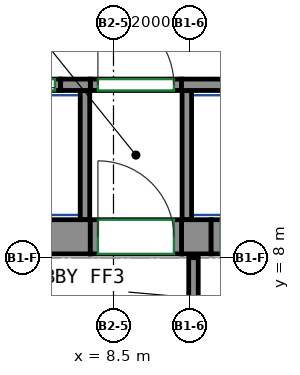
"""IFC4 building model, lengths in metres.
Left out: names, types, materials, properties, quantities, classifications, styles, units other than length and angle.
Written with IfcOpenShell. Run it as: python <this file> out.ifc"""

import sys

from ifc_helpers import new_model, si_unit, direction, frame, frame_2d, origin, place, context, subcontext, project, spatial, rectangle, extrude, source, transform, mapped, element, fill, save


model = new_model("IFC4")
c1 = context("Model", 3, precision=1e-05, world=origin(), true_north=direction((0.0, 1.0)))
c2 = subcontext(c1, "Body", "Model", "MODEL_VIEW")
j1 = project(units=[si_unit("LENGTHUNIT", "METRE"), si_unit("PLANEANGLEUNIT", "RADIAN")], contexts=[c1])
p1 = place(None, origin())
s1 = spatial("IfcSite", under=j1, at=p1, CompositionType="ELEMENT")
p2 = place(p1, origin())
s2 = spatial("IfcBuilding", under=s1, at=p2, CompositionType="ELEMENT")
p3 = place(p2, frame((0.0, 0.0, 120.6)))
s3 = spatial("IfcBuildingStorey", under=s2, at=p3, CompositionType="ELEMENT", Elevation=120.6)
m1 = source(origin(), c2, "Body", "SweptSolid", [
    extrude(rectangle(XDim=14.18, YDim=0.9, at=frame_2d((7.09, 0.0))), origin(), (0.0, 0.0, 1.0), 3.72),
])
p4 = place(p3, frame((-6.29, 8.55, 0.0), z_axis=(0.0, 0.0, 1.0), x_axis=(1.0, 0.0, 0.0)))
e1 = element("IfcWall", 1, at=p4, inside=s3, PredefinedType="SHEAR", context=c2, shape_type="MappedRepresentation", body=[
    mapped(m1, transform((0.0, 0.0, 0.0))),
])
m2 = source(origin(), c2, "Body", "SweptSolid", [
    extrude(rectangle(XDim=0.78, YDim=0.9, at=frame_2d((0.39, 0.0))), origin(), (0.0, 0.0, 1.0), 3.72),
])
p5 = place(p3, frame((10.29, 8.55, 0.0), z_axis=(0.0, 0.0, 1.0), x_axis=(1.0, 0.0, 0.0)))
e2 = element("IfcWall", 2, at=p5, inside=s3, PredefinedType="SHEAR", context=c2, shape_type="MappedRepresentation", body=[
    mapped(m2, transform((0.0, 0.0, 0.0))),
])
m3 = source(origin(), c2, "Body", "SweptSolid", [
    extrude(rectangle(XDim=0.78, YDim=0.3, at=frame_2d((0.39, 0.0))), origin(), (0.0, 0.0, 1.0), 3.72),
])
p6 = place(p3, frame((7.11, 12.55, 0.0), z_axis=(0.0, 0.0, 1.0), x_axis=(1.0, 0.0, 0.0)))
e3 = element("IfcWall", 3, at=p6, inside=s3, PredefinedType="SHEAR", context=c2, shape_type="MappedRepresentation", body=[
    mapped(m3, transform((0.0, 0.0, 0.0))),
])
m4 = source(origin(), c2, "Body", "SweptSolid", [
    extrude(rectangle(XDim=2.82, YDim=0.3, at=frame_2d((1.41, 0.0))), origin(), (0.0, 0.0, 1.0), 3.72),
])
p7 = place(p3, frame((10.29, 12.55, 0.0), z_axis=(0.0, 0.0, 1.0), x_axis=(1.0, 0.0, 0.0)))
e4 = element("IfcWall", 4, at=p7, inside=s3, PredefinedType="SHEAR", context=c2, shape_type="MappedRepresentation", body=[
    mapped(m4, transform((0.0, 0.0, 0.0))),
])
m5 = source(origin(), c2, "Body", "SweptSolid", [
    extrude(rectangle(XDim=1.4, YDim=0.3, at=frame_2d((0.7, 0.0))), origin(), (0.0, 0.0, 1.0), 3.72),
])
p8 = place(p3, frame((5.71, 12.55, 0.0), z_axis=(0.0, 0.0, 1.0), x_axis=(1.0, 0.0, 0.0)))
e5 = element("IfcWall", 5, at=p8, inside=s3, PredefinedType="PARTITIONING", context=c2, shape_type="MappedRepresentation", body=[
    mapped(m5, transform((0.0, 0.0, 0.0))),
])
p9 = place(p8, frame((0.15, 0.0, 0.0)))
e6 = element("IfcOpeningElement", 6, at=p9, cuts=e5, PredefinedType="OPENING", context=c2, shape_type="SweptSolid", body=[
    extrude(rectangle(XDim=1.1, YDim=2.1, at=frame_2d((0.55, 1.05))), frame((0.0, 0.16, 0.0), z_axis=(0.0, -1.0, 0.0), x_axis=(1.0, 0.0, 0.0)), (0.0, 0.0, 1.0), 0.32),
])
m6 = source(origin(), c2, "Body", "SweptSolid", [
    extrude(rectangle(XDim=2.4, YDim=0.3, at=frame_2d((1.2, 0.0))), origin(), (0.0, 0.0, 1.0), 3.72),
])
p10 = place(p3, frame((7.89, 12.55, 0.0), z_axis=(0.0, 0.0, 1.0), x_axis=(1.0, 0.0, 0.0)))
e7 = element("IfcWall", 7, at=p10, inside=s3, PredefinedType="PARTITIONING", context=c2, shape_type="MappedRepresentation", body=[
    mapped(m6, transform((0.0, 0.0, 0.0))),
])
p11 = place(p10, frame((0.2, 0.0, 0.0)))
e8 = element("IfcOpeningElement", 8, at=p11, cuts=e7, PredefinedType="OPENING", context=c2, shape_type="SweptSolid", body=[
    extrude(rectangle(XDim=2.0, YDim=2.1, at=frame_2d((1.0, 1.05))), frame((0.0, 0.16, 0.0), z_axis=(0.0, -1.0, 0.0), x_axis=(1.0, 0.0, 0.0)), (0.0, 0.0, 1.0), 0.32),
])
m7 = source(origin(), c2, "Body", "SweptSolid", [
    extrude(rectangle(XDim=2.65, YDim=0.25, at=frame_2d((1.325, 0.0))), origin(), (0.0, 0.0, 1.0), 3.72),
])
p12 = place(p3, frame((10.605, 5.35, 0.0), z_axis=(0.0, 0.0, 1.0), x_axis=(0.0, 1.0, 0.0)))
e9 = element("IfcWall", 9, at=p12, inside=s3, PredefinedType="PARTITIONING", context=c2, shape_type="MappedRepresentation", body=[
    mapped(m7, transform((0.0, 0.0, 0.0))),
])
m8 = source(origin(), c2, "Body", "SweptSolid", [
    extrude(rectangle(XDim=3.4, YDim=0.25, at=frame_2d((1.7, 0.0))), origin(), (0.0, 0.0, 1.0), 3.72),
])
for number, where, z_axis, x_axis in (
    (10, (10.43, 9.0, 0.0), (0.0, 0.0, 1.0), (0.0, 1.0, 0.0)),
    (11, (7.75, 9.0, 0.0), (0.0, 0.0, 1.0), (0.0, 1.0, 0.0)),
):
    element("IfcWall", number, at=place(p3, frame(where, z_axis=z_axis, x_axis=x_axis)), inside=s3, PredefinedType="PARTITIONING", context=c2, shape_type="MappedRepresentation", body=[
        mapped(m8, transform((0.0, 0.0, 0.0))),
    ])
m9 = source(origin(), c2, "Body", "SweptSolid", [
    extrude(rectangle(XDim=2.4, YDim=0.9, at=frame_2d((1.2, 0.0))), origin(), (0.0, 0.0, 1.0), 2.7),
])
p13 = place(p3, frame((7.89, 8.55, 0.0), z_axis=(0.0, 0.0, 1.0), x_axis=(1.0, 0.0, 0.0)))
e12 = element("IfcWall", 12, at=p13, inside=s3, PredefinedType="PARTITIONING", context=c2, shape_type="MappedRepresentation", body=[
    mapped(m9, transform((0.0, 0.0, 0.0))),
])
p14 = place(p13, frame((0.2, 0.0, 0.0)))
e13 = element("IfcOpeningElement", 13, at=p14, cuts=e12, PredefinedType="OPENING", context=c2, shape_type="SweptSolid", body=[
    extrude(rectangle(XDim=2.0, YDim=2.1, at=frame_2d((1.0, 1.05))), frame((0.0, 0.46, 0.0), z_axis=(0.0, -1.0, 0.0), x_axis=(1.0, 0.0, 0.0)), (0.0, 0.0, 1.0), 0.92),
])
m10 = source(origin(), c2, "Body", "SweptSolid", [
    extrude(rectangle(XDim=1.4, YDim=0.9, at=frame_2d((0.7, 0.0))), origin(), (0.0, 0.0, 1.0), 2.7),
])
p15 = place(p3, frame((11.07, 8.55, 0.0), z_axis=(0.0, 0.0, 1.0), x_axis=(1.0, 0.0, 0.0)))
e14 = element("IfcWall", 14, at=p15, inside=s3, PredefinedType="PARTITIONING", context=c2, shape_type="MappedRepresentation", body=[
    mapped(m10, transform((0.0, 0.0, 0.0))),
])
p16 = place(p15, frame((0.25, 0.0, 0.0)))
e15 = element("IfcOpeningElement", 15, at=p16, cuts=e14, PredefinedType="OPENING", context=c2, shape_type="SweptSolid", body=[
    extrude(rectangle(XDim=0.9, YDim=2.1, at=frame_2d((0.45, 1.05))), frame((0.0, 0.46, 0.0), z_axis=(0.0, -1.0, 0.0), x_axis=(1.0, 0.0, 0.0)), (0.0, 0.0, 1.0), 0.92),
])
p17 = place(p11, origin())
e16 = element("IfcDoor", 16, at=p17, inside=s3, OperationType="DOUBLE_DOOR_SINGLE_SWING", PredefinedType="DOOR", context=c2, shape_type="SweptSolid", body=[
    extrude(rectangle(XDim=2.0, YDim=2.1, at=frame_2d((1.0, 1.05))), frame((0.0, 0.025, 0.0), z_axis=(0.0, -1.0, 0.0), x_axis=(1.0, 0.0, 0.0)), (0.0, 0.0, 1.0), 0.05),
])
fill(e8, e16)
p18 = place(p14, origin())
e17 = element("IfcDoor", 17, at=p18, inside=s3, OperationType="DOUBLE_DOOR_SINGLE_SWING", PredefinedType="DOOR", context=c2, shape_type="SweptSolid", body=[
    extrude(rectangle(XDim=2.0, YDim=2.1, at=frame_2d((1.0, 1.05))), frame((0.0, 0.355, 0.0), z_axis=(0.0, -1.0, 0.0), x_axis=(1.0, 0.0, 0.0)), (0.0, 0.0, 1.0), 0.05),
])
fill(e13, e17)
p19 = place(p9, origin())
e18 = element("IfcDoor", 18, at=p19, inside=s3, OperationType="DOUBLE_DOOR_SLIDING", PredefinedType="DOOR", context=c2, shape_type="SweptSolid", body=[
    extrude(rectangle(XDim=1.1, YDim=2.1, at=frame_2d((0.55, 1.05))), frame((0.0, 0.025, 0.0), z_axis=(0.0, -1.0, 0.0), x_axis=(1.0, 0.0, 0.0)), (0.0, 0.0, 1.0), 0.05),
])
fill(e6, e18)
save(model, sys.argv[1])
